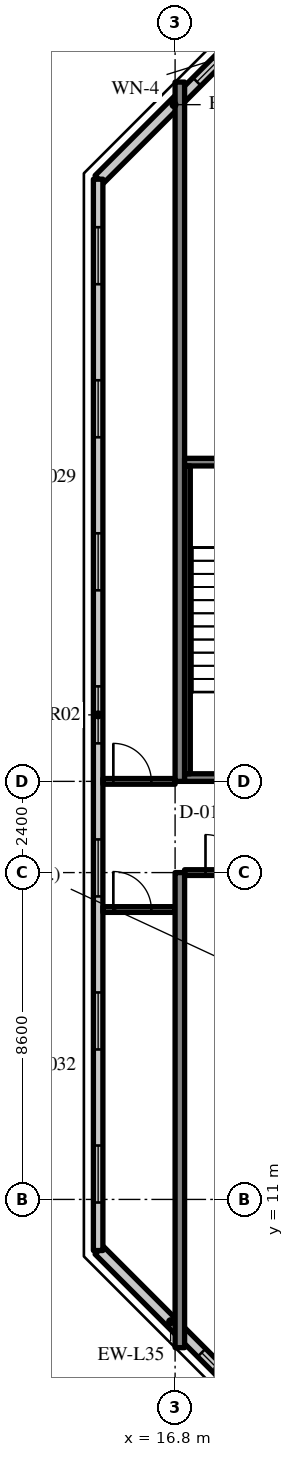
"""IFC4 building model, lengths in metres.
Left out: names, types, materials, properties, quantities, classifications, styles, units other than length and angle.
Written with IfcOpenShell. Run it as: python <this file> out.ifc"""

import sys

from ifc_helpers import new_model, si_unit, direction, frame, frame_2d, origin, place, context, subcontext, project, spatial, rectangle, extrude, source, transform, mapped, element, fill, save


model = new_model("IFC4")
c1 = context("Model", 3, precision=1e-05, world=origin(), true_north=direction((0.0, 1.0)))
c2 = subcontext(c1, "Body", "Model", "MODEL_VIEW")
j1 = project(units=[si_unit("LENGTHUNIT", "METRE"), si_unit("PLANEANGLEUNIT", "RADIAN")], contexts=[c1])
p1 = place(None, origin())
s1 = spatial("IfcSite", under=j1, at=p1, CompositionType="ELEMENT")
p2 = place(p1, origin())
s2 = spatial("IfcBuilding", under=s1, at=p2, CompositionType="ELEMENT")
p3 = place(p2, frame((0.0, 0.0, 293.7)))
s3 = spatial("IfcBuildingStorey", under=s2, at=p3, CompositionType="ELEMENT", Elevation=293.7)
m1 = source(origin(), c2, "Body", "SweptSolid", [
    extrude(rectangle(XDim=12.5, YDim=0.25, at=frame_2d((6.25, 0.0))), origin(), (0.0, 0.0, 1.0), 3.72),
])
p4 = place(p3, frame((16.925, 7.1, 0.0), z_axis=(0.0, 0.0, 1.0), x_axis=(0.0, 1.0, 0.0)))
e1 = element("IfcWall", 1, at=p4, inside=s3, PredefinedType="SHEAR", context=c2, shape_type="MappedRepresentation", body=[
    mapped(m1, transform((0.0, 0.0, 0.0), scale=1.0)),
])
m2 = source(origin(), c2, "Body", "SweptSolid", [
    extrude(rectangle(XDim=18.4, YDim=0.25, at=frame_2d((9.2, 0.0))), origin(), (0.0, 0.0, 1.0), 3.72),
])
p5 = place(p3, frame((16.925, 22.0, 0.0), z_axis=(0.0, 0.0, 1.0), x_axis=(0.0, 1.0, 0.0)))
e2 = element("IfcWall", 2, at=p5, inside=s3, PredefinedType="SHEAR", context=c2, shape_type="MappedRepresentation", body=[
    mapped(m2, transform((0.0, 0.0, 0.0), scale=1.0)),
])
m3 = source(origin(), c2, "Body", "SweptSolid", [
    extrude(rectangle(XDim=5.576, YDim=0.3, at=frame_2d((2.788, 0.0))), origin(), (0.0, 0.0, 1.0), 3.72),
])
p6 = place(p3, frame((18.743, 41.777, 0.0), z_axis=(0.0, 0.0, 1.0), x_axis=(-0.707106781187, -0.707106781187, 0.0)))
e3 = element("IfcWall", 3, at=p6, inside=s3, PredefinedType="SOLIDWALL", context=c2, shape_type="MappedRepresentation", body=[
    mapped(m3, transform((0.0, 0.0, 0.0), scale=1.0)),
])
m4 = source(origin(), c2, "Body", "SweptSolid", [
    extrude(rectangle(XDim=1.8, YDim=1.5, at=frame_2d((0.9, 0.75))), frame((0.0, 0.16, 0.0), z_axis=(0.0, -1.0, 0.0), x_axis=(1.0, 0.0, 0.0)), (0.0, 0.0, 1.0), 0.32),
])
p7 = place(p6, frame((0.135, 0.0, 0.9)))
e4 = element("IfcOpeningElement", 4, at=p7, cuts=e3, PredefinedType="OPENING", context=c2, shape_type="MappedRepresentation", body=[
    mapped(m4, transform((0.0, 0.0, 0.0), scale=1.0)),
])
m5 = source(origin(), c2, "Body", "SweptSolid", [
    extrude(rectangle(XDim=5.326, YDim=0.3, at=frame_2d((2.663, 0.0))), origin(), (0.0, 0.0, 1.0), 3.72),
])
p8 = place(p3, frame((14.8, 9.666, 0.0), z_axis=(0.0, 0.0, 1.0), x_axis=(0.707083859269, -0.707129702361, 0.0)))
e5 = element("IfcWall", 5, at=p8, inside=s3, PredefinedType="SOLIDWALL", context=c2, shape_type="MappedRepresentation", body=[
    mapped(m5, transform((0.0, 0.0, 0.0), scale=1.0)),
])
m6 = source(origin(), c2, "Body", "SweptSolid", [
    extrude(rectangle(XDim=1.2, YDim=1.5, at=frame_2d((0.6, 0.75))), frame((0.0, 0.16, 0.0), z_axis=(0.0, -1.0, 0.0), x_axis=(1.0, 0.0, 0.0)), (0.0, 0.0, 1.0), 0.32),
])
p9 = place(p8, frame((3.815, 0.0, 0.9)))
e6 = element("IfcOpeningElement", 6, at=p9, cuts=e5, PredefinedType="OPENING", context=c2, shape_type="MappedRepresentation", body=[
    mapped(m6, transform((0.0, 0.0, 0.0), scale=1.0)),
])
m7 = source(origin(), c2, "Body", "SweptSolid", [
    extrude(rectangle(XDim=28.189, YDim=0.25, at=frame_2d((14.095, 0.0))), origin(), (0.0, 0.0, 1.0), 3.72),
])
p10 = place(p3, frame((14.775, 37.845, 0.0), z_axis=(0.0, 0.0, 1.0), x_axis=(0.0, -1.0, 0.0)))
e7 = element("IfcWall", 7, at=p10, inside=s3, PredefinedType="SOLIDWALL", context=c2, shape_type="MappedRepresentation", body=[
    mapped(m7, transform((0.0, 0.0, 0.0), scale=1.0)),
])
m8 = source(origin(), c2, "Body", "SweptSolid", [
    extrude(rectangle(XDim=1.5, YDim=1.5, at=frame_2d((0.75, 0.75))), frame((0.0, 0.135, 0.0), z_axis=(0.0, -1.0, 0.0), x_axis=(1.0, 0.0, 0.0)), (0.0, 0.0, 1.0), 0.27),
])
p11 = place(p10, frame((1.263, 0.0, 0.9)))
e8 = element("IfcOpeningElement", 8, at=p11, cuts=e7, PredefinedType="OPENING", context=c2, shape_type="MappedRepresentation", body=[
    mapped(m8, transform((0.0, 0.0, 0.0), scale=1.0)),
])
p12 = place(p10, frame((5.291, 0.0, 0.9)))
e9 = element("IfcOpeningElement", 9, at=p12, cuts=e7, PredefinedType="OPENING", context=c2, shape_type="MappedRepresentation", body=[
    mapped(m8, transform((0.0, 0.0, 0.0), scale=1.0)),
])
p13 = place(p10, frame((9.318, 0.0, 0.9)))
e10 = element("IfcOpeningElement", 10, at=p13, cuts=e7, PredefinedType="OPENING", context=c2, shape_type="MappedRepresentation", body=[
    mapped(m8, transform((0.0, 0.0, 0.0), scale=1.0)),
])
p14 = place(p10, frame((13.345, 0.0, 0.9)))
e11 = element("IfcOpeningElement", 11, at=p14, cuts=e7, PredefinedType="OPENING", context=c2, shape_type="MappedRepresentation", body=[
    mapped(m8, transform((0.0, 0.0, 0.0), scale=1.0)),
])
p15 = place(p10, frame((17.372, 0.0, 0.9)))
e12 = element("IfcOpeningElement", 12, at=p15, cuts=e7, PredefinedType="OPENING", context=c2, shape_type="MappedRepresentation", body=[
    mapped(m8, transform((0.0, 0.0, 0.0), scale=1.0)),
])
p16 = place(p10, frame((21.399, 0.0, 0.9)))
e13 = element("IfcOpeningElement", 13, at=p16, cuts=e7, PredefinedType="OPENING", context=c2, shape_type="MappedRepresentation", body=[
    mapped(m8, transform((0.0, 0.0, 0.0), scale=1.0)),
])
p17 = place(p10, frame((25.426, 0.0, 0.9)))
e14 = element("IfcOpeningElement", 14, at=p17, cuts=e7, PredefinedType="OPENING", context=c2, shape_type="MappedRepresentation", body=[
    mapped(m8, transform((0.0, 0.0, 0.0), scale=1.0)),
])
m9 = source(origin(), c2, "Body", "SweptSolid", [
    extrude(rectangle(XDim=8.15, YDim=0.2, at=frame_2d((4.075, 0.0))), origin(), (0.0, 0.0, 1.0), 3.72),
])
p18 = place(p3, frame((17.05, 22.1, 0.0), z_axis=(0.0, 0.0, 1.0), x_axis=(1.0, 0.0, 0.0)))
e15 = element("IfcWall", 15, at=p18, inside=s3, PredefinedType="SOLIDWALL", context=c2, shape_type="MappedRepresentation", body=[
    mapped(m9, transform((0.0, 0.0, 0.0), scale=1.0)),
])
m10 = source(origin(), c2, "Body", "SweptSolid", [
    extrude(rectangle(XDim=1.2, YDim=2.1, at=frame_2d((0.6, 1.05))), frame((0.0, 0.11, 0.0), z_axis=(0.0, -1.0, 0.0), x_axis=(1.0, 0.0, 0.0)), (0.0, 0.0, 1.0), 0.22),
])
p19 = place(p18, frame((5.95, 0.0, 0.0)))
e16 = element("IfcOpeningElement", 16, at=p19, cuts=e15, PredefinedType="OPENING", context=c2, shape_type="MappedRepresentation", body=[
    mapped(m10, transform((0.0, 0.0, 0.0), scale=1.0)),
])
p20 = place(p3, frame((17.05, 30.4, 0.0), z_axis=(0.0, 0.0, 1.0), x_axis=(1.0, 0.0, 0.0)))
e17 = element("IfcWall", 17, at=p20, inside=s3, PredefinedType="SOLIDWALL", context=c2, shape_type="MappedRepresentation", body=[
    mapped(m9, transform((0.0, 0.0, 0.0), scale=1.0)),
])
m11 = source(origin(), c2, "Body", "SweptSolid", [
    extrude(rectangle(XDim=1.0, YDim=2.1, at=frame_2d((0.5, 1.05))), frame((0.0, 0.11, 0.0), z_axis=(0.0, -1.0, 0.0), x_axis=(1.0, 0.0, 0.0)), (0.0, 0.0, 1.0), 0.22),
])
p21 = place(p20, frame((6.05, 0.0, 0.0)))
e18 = element("IfcOpeningElement", 18, at=p21, cuts=e17, PredefinedType="OPENING", context=c2, shape_type="MappedRepresentation", body=[
    mapped(m11, transform((0.0, 0.0, 0.0), scale=1.0)),
])
m12 = source(origin(), c2, "Body", "SweptSolid", [
    extrude(rectangle(XDim=8.1, YDim=0.15, at=frame_2d((4.05, 0.0))), origin(), (0.0, 0.0, 1.0), 3.72),
])
p22 = place(p3, frame((17.125, 22.2, 0.0), z_axis=(0.0, 0.0, 1.0), x_axis=(0.0, 1.0, 0.0)))
e19 = element("IfcWall", 19, at=p22, inside=s3, PredefinedType="SOLIDWALL", context=c2, shape_type="MappedRepresentation", body=[
    mapped(m12, transform((0.0, 0.0, 0.0), scale=1.0)),
])
m13 = source(origin(), c2, "Body", "SweptSolid", [
    extrude(rectangle(XDim=8.025, YDim=0.15, at=frame_2d((4.012, 0.0))), origin(), (0.0, 0.0, 1.0), 3.02),
])
p23 = place(p3, frame((17.05, 19.6, 0.0), z_axis=(0.0, 0.0, 1.0), x_axis=(1.0, 0.0, 0.0)))
e20 = element("IfcWall", 20, at=p23, inside=s3, PredefinedType="PARTITIONING", context=c2, shape_type="MappedRepresentation", body=[
    mapped(m13, transform((0.0, 0.0, 0.0), scale=1.0)),
])
m14 = source(origin(), c2, "Body", "SweptSolid", [
    extrude(rectangle(XDim=1.0, YDim=2.1, at=frame_2d((0.5, 1.05))), frame((0.0, 0.085, 0.0), z_axis=(0.0, -1.0, 0.0), x_axis=(1.0, 0.0, 0.0)), (0.0, 0.0, 1.0), 0.17),
])
p24 = place(p23, frame((0.55, 0.0, 0.0)))
e21 = element("IfcOpeningElement", 21, at=p24, cuts=e20, PredefinedType="OPENING", context=c2, shape_type="MappedRepresentation", body=[
    mapped(m14, transform((0.0, 0.0, 0.0), scale=1.0)),
])
m15 = source(origin(), c2, "Body", "SweptSolid", [
    extrude(rectangle(XDim=1.9, YDim=0.15, at=frame_2d((0.95, 0.0))), origin(), (0.0, 0.0, 1.0), 3.02),
])
p25 = place(p3, frame((14.9, 22.0, 0.0), z_axis=(0.0, 0.0, 1.0), x_axis=(1.0, 0.0, 0.0)))
e22 = element("IfcWall", 22, at=p25, inside=s3, PredefinedType="PARTITIONING", context=c2, shape_type="MappedRepresentation", body=[
    mapped(m15, transform((0.0, 0.0, 0.0), scale=1.0)),
])
p26 = place(p25, frame((0.275, 0.0, 0.0)))
e23 = element("IfcOpeningElement", 23, at=p26, cuts=e22, PredefinedType="OPENING", context=c2, shape_type="MappedRepresentation", body=[
    mapped(m14, transform((0.0, 0.0, 0.0), scale=1.0)),
])
p27 = place(p3, frame((14.9, 18.628, 0.0), z_axis=(0.0, 0.0, 1.0), x_axis=(1.0, 0.0, 0.0)))
e24 = element("IfcWall", 24, at=p27, inside=s3, PredefinedType="PARTITIONING", context=c2, shape_type="MappedRepresentation", body=[
    mapped(m15, transform((0.0, 0.0, 0.0), scale=1.0)),
])
p28 = place(p27, frame((0.275, 0.0, 0.0)))
e25 = element("IfcOpeningElement", 25, at=p28, cuts=e24, PredefinedType="OPENING", context=c2, shape_type="MappedRepresentation", body=[
    mapped(m14, transform((0.0, 0.0, 0.0), scale=1.0)),
])
m16 = source(origin(), c2, "Body", "SweptSolid", [
    extrude(rectangle(XDim=1.8, YDim=1.5, at=frame_2d((0.9, 0.75))), frame((0.0, 0.03, 0.0), z_axis=(0.0, -1.0, 0.0), x_axis=(1.0, 0.0, 0.0)), (0.0, 0.0, 1.0), 0.06),
])
p29 = place(p7, origin())
e26 = element("IfcWindow", 26, at=p29, inside=s3, PartitioningType="SINGLE_PANEL", PredefinedType="WINDOW", context=c2, shape_type="MappedRepresentation", body=[
    mapped(m16, transform((0.0, 0.0, 0.0), scale=1.0)),
])
fill(e4, e26)
m17 = source(origin(), c2, "Body", "SweptSolid", [
    extrude(rectangle(XDim=1.2, YDim=1.5, at=frame_2d((0.6, 0.75))), frame((0.0, 0.03, 0.0), z_axis=(0.0, -1.0, 0.0), x_axis=(1.0, 0.0, 0.0)), (0.0, 0.0, 1.0), 0.06),
])
p30 = place(p9, origin())
e27 = element("IfcWindow", 27, at=p30, inside=s3, PartitioningType="SINGLE_PANEL", PredefinedType="WINDOW", context=c2, shape_type="MappedRepresentation", body=[
    mapped(m17, transform((0.0, 0.0, 0.0), scale=1.0)),
])
fill(e6, e27)
m18 = source(origin(), c2, "Body", "SweptSolid", [
    extrude(rectangle(XDim=1.5, YDim=1.5, at=frame_2d((0.75, 0.75))), frame((0.0, 0.03, 0.0), z_axis=(0.0, -1.0, 0.0), x_axis=(1.0, 0.0, 0.0)), (0.0, 0.0, 1.0), 0.06),
])
p31 = place(p11, origin())
e28 = element("IfcWindow", 28, at=p31, inside=s3, PartitioningType="SINGLE_PANEL", PredefinedType="WINDOW", context=c2, shape_type="MappedRepresentation", body=[
    mapped(m18, transform((0.0, 0.0, 0.0), scale=1.0)),
])
fill(e8, e28)
p32 = place(p12, origin())
e29 = element("IfcWindow", 29, at=p32, inside=s3, PartitioningType="SINGLE_PANEL", PredefinedType="WINDOW", context=c2, shape_type="MappedRepresentation", body=[
    mapped(m18, transform((0.0, 0.0, 0.0), scale=1.0)),
])
fill(e9, e29)
p33 = place(p13, origin())
e30 = element("IfcWindow", 30, at=p33, inside=s3, PartitioningType="SINGLE_PANEL", PredefinedType="WINDOW", context=c2, shape_type="MappedRepresentation", body=[
    mapped(m18, transform((0.0, 0.0, 0.0), scale=1.0)),
])
fill(e10, e30)
p34 = place(p14, origin())
e31 = element("IfcWindow", 31, at=p34, inside=s3, PartitioningType="SINGLE_PANEL", PredefinedType="WINDOW", context=c2, shape_type="MappedRepresentation", body=[
    mapped(m18, transform((0.0, 0.0, 0.0), scale=1.0)),
])
fill(e11, e31)
p35 = place(p15, origin())
e32 = element("IfcWindow", 32, at=p35, inside=s3, PartitioningType="SINGLE_PANEL", PredefinedType="WINDOW", context=c2, shape_type="MappedRepresentation", body=[
    mapped(m18, transform((0.0, 0.0, 0.0), scale=1.0)),
])
fill(e12, e32)
p36 = place(p16, origin())
e33 = element("IfcWindow", 33, at=p36, inside=s3, PartitioningType="SINGLE_PANEL", PredefinedType="WINDOW", context=c2, shape_type="MappedRepresentation", body=[
    mapped(m18, transform((0.0, 0.0, 0.0), scale=1.0)),
])
fill(e13, e33)
p37 = place(p17, origin())
e34 = element("IfcWindow", 34, at=p37, inside=s3, PartitioningType="SINGLE_PANEL", PredefinedType="WINDOW", context=c2, shape_type="MappedRepresentation", body=[
    mapped(m18, transform((0.0, 0.0, 0.0), scale=1.0)),
])
fill(e14, e34)
m19 = source(origin(), c2, "Body", "SweptSolid", [
    extrude(rectangle(XDim=1.0, YDim=2.1, at=frame_2d((0.5, 1.05))), frame((0.0, 0.025, 0.0), z_axis=(0.0, -1.0, 0.0), x_axis=(1.0, 0.0, 0.0)), (0.0, 0.0, 1.0), 0.05),
])
p38 = place(p24, origin())
e35 = element("IfcDoor", 35, at=p38, inside=s3, OperationType="SINGLE_SWING_LEFT", PredefinedType="DOOR", context=c2, shape_type="MappedRepresentation", body=[
    mapped(m19, transform((0.0, 0.0, 0.0), scale=1.0)),
])
fill(e21, e35)
p39 = place(p26, origin())
e36 = element("IfcDoor", 36, at=p39, inside=s3, OperationType="SINGLE_SWING_LEFT", PredefinedType="DOOR", context=c2, shape_type="MappedRepresentation", body=[
    mapped(m19, transform((0.0, 0.0, 0.0), scale=1.0)),
])
fill(e23, e36)
p40 = place(p28, origin())
e37 = element("IfcDoor", 37, at=p40, inside=s3, OperationType="SINGLE_SWING_LEFT", PredefinedType="DOOR", context=c2, shape_type="MappedRepresentation", body=[
    mapped(m19, transform((0.0, 0.0, 0.0), scale=1.0)),
])
fill(e25, e37)
save(model, sys.argv[1])
